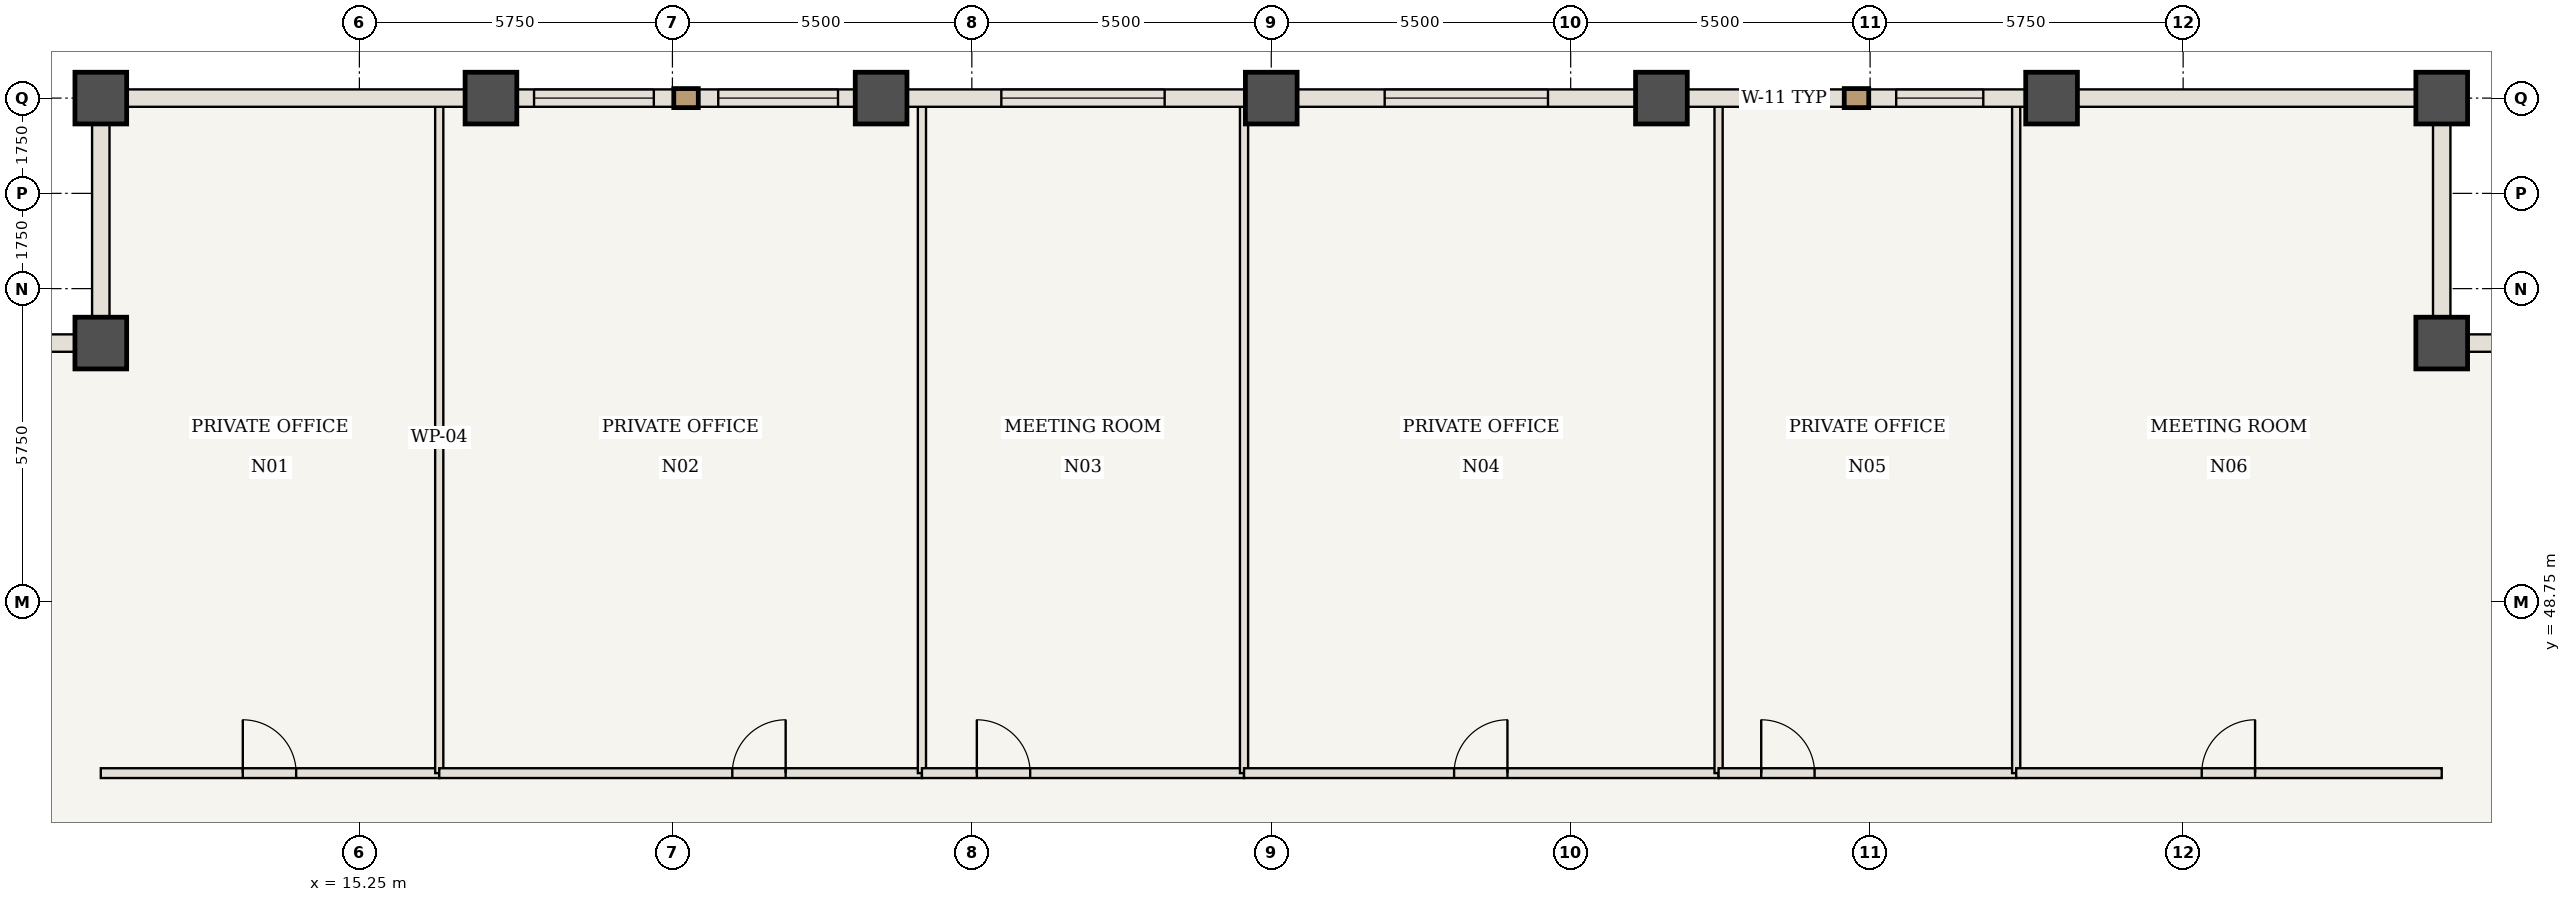
"""IFC4 building model, lengths in metres.
Left out: names, types, materials, properties, quantities, classifications, styles, units other than length and angle.
Written with IfcOpenShell. Run it as: python <this file> out.ifc"""

import sys

from ifc_helpers import new_model, si_unit, direction, frame, frame_2d, origin, origin_2d, place, context, subcontext, project, spatial, rectangle, extrude, element, fill, save


model = new_model("IFC4")
c1 = context("Model", 3, precision=1e-05, world=origin(), true_north=direction((0.0, 1.0)))
c2 = subcontext(c1, "Body", "Model", "MODEL_VIEW")
j1 = project(units=[si_unit("LENGTHUNIT", "METRE"), si_unit("PLANEANGLEUNIT", "RADIAN")], contexts=[c1])
p1 = place(None, origin())
s1 = spatial("IfcSite", under=j1, at=p1, CompositionType="ELEMENT")
p2 = place(p1, origin())
s2 = spatial("IfcBuilding", under=s1, at=p2, CompositionType="ELEMENT")
p3 = place(p2, frame((0.0, 0.0, 114.45)))
s3 = spatial("IfcBuildingStorey", under=s2, at=p3, CompositionType="ELEMENT", Elevation=114.45)
for number, where, z_axis, x_axis in (
    (1, (53.5, 53.5, 0.0), (0.0, 0.0, 1.0), (1.0, 0.0, 0.0)),
    (2, (53.5, 58.0, 0.0), (0.0, 0.0, 1.0), (1.0, 0.0, 0.0)),
    (3, (10.5, 58.0, 0.0), (0.0, 0.0, 1.0), (1.0, 0.0, 0.0)),
    (4, (10.5, 53.5, 0.0), (0.0, 0.0, 1.0), (1.0, 0.0, 0.0)),
    (5, (17.667, 58.0, 0.0), (0.0, 0.0, 1.0), (1.0, 0.0, 0.0)),
    (6, (24.833, 58.0, 0.0), (0.0, 0.0, 1.0), (1.0, 0.0, 0.0)),
    (7, (32.0, 58.0, 0.0), (0.0, 0.0, 1.0), (1.0, 0.0, 0.0)),
    (8, (39.167, 58.0, 0.0), (0.0, 0.0, 1.0), (1.0, 0.0, 0.0)),
    (9, (46.333, 58.0, 0.0), (0.0, 0.0, 1.0), (1.0, 0.0, 0.0)),
):
    element("IfcColumn", number, at=place(p3, frame(where, z_axis=z_axis, x_axis=x_axis)), inside=s3, PredefinedType="COLUMN", context=c2, shape_type="SweptSolid", body=[
        extrude(rectangle(XDim=0.95, YDim=0.95, at=origin_2d()), origin(), (0.0, 0.0, 1.0), 3.85),
    ])
p4 = place(p3, frame((10.5, 45.6, 0.0), z_axis=(0.0, 0.0, 1.0), x_axis=(1.0, 0.0, 0.0)))
e10 = element("IfcWall", 10, at=p4, inside=s3, PredefinedType="STANDARD", context=c2, shape_type="SweptSolid", body=[
    extrude(rectangle(XDim=6.217, YDim=0.18, at=frame_2d((3.108, 0.0))), origin(), (0.0, 0.0, 1.0), 3.685),
])
p5 = place(p4, frame((2.608, 0.0, 0.0)))
e11 = element("IfcOpeningElement", 11, at=p5, cuts=e10, PredefinedType="OPENING", context=c2, shape_type="SweptSolid", body=[
    extrude(rectangle(XDim=0.98, YDim=2.2, at=frame_2d((0.49, 1.1))), frame((0.0, 0.1, 0.0), z_axis=(0.0, -1.0, 0.0), x_axis=(1.0, 0.0, 0.0)), (0.0, 0.0, 1.0), 0.2),
])
p6 = place(p3, frame((16.717, 45.6, 0.0), z_axis=(0.0, 0.0, 1.0), x_axis=(0.0, 1.0, 0.0)))
e12 = element("IfcWall", 12, at=p6, inside=s3, PredefinedType="STANDARD", context=c2, shape_type="SweptSolid", body=[
    extrude(rectangle(XDim=12.34, YDim=0.15, at=frame_2d((6.17, 0.0))), origin(), (0.0, 0.0, 1.0), 3.685),
])
p7 = place(p3, frame((16.717, 45.6, 0.0), z_axis=(0.0, 0.0, 1.0), x_axis=(1.0, 0.0, 0.0)))
e13 = element("IfcWall", 13, at=p7, inside=s3, PredefinedType="STANDARD", context=c2, shape_type="SweptSolid", body=[
    extrude(rectangle(XDim=8.866, YDim=0.18, at=frame_2d((4.433, 0.0))), origin(), (0.0, 0.0, 1.0), 3.685),
])
p8 = place(p7, frame((5.383, 0.0, 0.0)))
e14 = element("IfcOpeningElement", 14, at=p8, cuts=e13, PredefinedType="OPENING", context=c2, shape_type="SweptSolid", body=[
    extrude(rectangle(XDim=0.98, YDim=2.2, at=frame_2d((0.49, 1.1))), frame((0.0, 0.1, 0.0), z_axis=(0.0, -1.0, 0.0), x_axis=(1.0, 0.0, 0.0)), (0.0, 0.0, 1.0), 0.2),
])
p9 = place(p3, frame((25.583, 45.6, 0.0), z_axis=(0.0, 0.0, 1.0), x_axis=(0.0, 1.0, 0.0)))
e15 = element("IfcWall", 15, at=p9, inside=s3, PredefinedType="STANDARD", context=c2, shape_type="SweptSolid", body=[
    extrude(rectangle(XDim=12.34, YDim=0.15, at=frame_2d((6.17, 0.0))), origin(), (0.0, 0.0, 1.0), 3.685),
])
p10 = place(p3, frame((25.583, 45.6, 0.0), z_axis=(0.0, 0.0, 1.0), x_axis=(1.0, 0.0, 0.0)))
e16 = element("IfcWall", 16, at=p10, inside=s3, PredefinedType="STANDARD", context=c2, shape_type="SweptSolid", body=[
    extrude(rectangle(XDim=5.917, YDim=0.18, at=frame_2d((2.958, 0.0))), origin(), (0.0, 0.0, 1.0), 3.685),
])
p11 = place(p10, frame((1.008, 0.0, 0.0)))
e17 = element("IfcOpeningElement", 17, at=p11, cuts=e16, PredefinedType="OPENING", context=c2, shape_type="SweptSolid", body=[
    extrude(rectangle(XDim=0.98, YDim=2.2, at=frame_2d((0.49, 1.1))), frame((0.0, 0.1, 0.0), z_axis=(0.0, -1.0, 0.0), x_axis=(1.0, 0.0, 0.0)), (0.0, 0.0, 1.0), 0.2),
])
p12 = place(p3, frame((31.5, 45.6, 0.0), z_axis=(0.0, 0.0, 1.0), x_axis=(0.0, 1.0, 0.0)))
e18 = element("IfcWall", 18, at=p12, inside=s3, PredefinedType="STANDARD", context=c2, shape_type="SweptSolid", body=[
    extrude(rectangle(XDim=12.34, YDim=0.15, at=frame_2d((6.17, 0.0))), origin(), (0.0, 0.0, 1.0), 3.685),
])
p13 = place(p3, frame((31.5, 45.6, 0.0), z_axis=(0.0, 0.0, 1.0), x_axis=(1.0, 0.0, 0.0)))
e19 = element("IfcWall", 19, at=p13, inside=s3, PredefinedType="STANDARD", context=c2, shape_type="SweptSolid", body=[
    extrude(rectangle(XDim=8.717, YDim=0.18, at=frame_2d((4.358, 0.0))), origin(), (0.0, 0.0, 1.0), 3.685),
])
p14 = place(p13, frame((3.858, 0.0, 0.0)))
e20 = element("IfcOpeningElement", 20, at=p14, cuts=e19, PredefinedType="OPENING", context=c2, shape_type="SweptSolid", body=[
    extrude(rectangle(XDim=0.98, YDim=2.2, at=frame_2d((0.49, 1.1))), frame((0.0, 0.1, 0.0), z_axis=(0.0, -1.0, 0.0), x_axis=(1.0, 0.0, 0.0)), (0.0, 0.0, 1.0), 0.2),
])
p15 = place(p3, frame((40.217, 45.6, 0.0), z_axis=(0.0, 0.0, 1.0), x_axis=(0.0, 1.0, 0.0)))
e21 = element("IfcWall", 21, at=p15, inside=s3, PredefinedType="STANDARD", context=c2, shape_type="SweptSolid", body=[
    extrude(rectangle(XDim=12.34, YDim=0.15, at=frame_2d((6.17, 0.0))), origin(), (0.0, 0.0, 1.0), 3.685),
])
p16 = place(p3, frame((40.217, 45.6, 0.0), z_axis=(0.0, 0.0, 1.0), x_axis=(1.0, 0.0, 0.0)))
e22 = element("IfcWall", 22, at=p16, inside=s3, PredefinedType="STANDARD", context=c2, shape_type="SweptSolid", body=[
    extrude(rectangle(XDim=5.467, YDim=0.18, at=frame_2d((2.733, 0.0))), origin(), (0.0, 0.0, 1.0), 3.685),
])
p17 = place(p16, frame((0.783, 0.0, 0.0)))
e23 = element("IfcOpeningElement", 23, at=p17, cuts=e22, PredefinedType="OPENING", context=c2, shape_type="SweptSolid", body=[
    extrude(rectangle(XDim=0.98, YDim=2.2, at=frame_2d((0.49, 1.1))), frame((0.0, 0.1, 0.0), z_axis=(0.0, -1.0, 0.0), x_axis=(1.0, 0.0, 0.0)), (0.0, 0.0, 1.0), 0.2),
])
p18 = place(p3, frame((45.683, 45.6, 0.0), z_axis=(0.0, 0.0, 1.0), x_axis=(0.0, 1.0, 0.0)))
e24 = element("IfcWall", 24, at=p18, inside=s3, PredefinedType="STANDARD", context=c2, shape_type="SweptSolid", body=[
    extrude(rectangle(XDim=12.34, YDim=0.15, at=frame_2d((6.17, 0.0))), origin(), (0.0, 0.0, 1.0), 3.685),
])
p19 = place(p3, frame((45.683, 45.6, 0.0), z_axis=(0.0, 0.0, 1.0), x_axis=(1.0, 0.0, 0.0)))
e25 = element("IfcWall", 25, at=p19, inside=s3, PredefinedType="STANDARD", context=c2, shape_type="SweptSolid", body=[
    extrude(rectangle(XDim=7.817, YDim=0.18, at=frame_2d((3.908, 0.0))), origin(), (0.0, 0.0, 1.0), 3.685),
])
p20 = place(p19, frame((3.408, 0.0, 0.0)))
e26 = element("IfcOpeningElement", 26, at=p20, cuts=e25, PredefinedType="OPENING", context=c2, shape_type="SweptSolid", body=[
    extrude(rectangle(XDim=0.98, YDim=2.2, at=frame_2d((0.49, 1.1))), frame((0.0, 0.1, 0.0), z_axis=(0.0, -1.0, 0.0), x_axis=(1.0, 0.0, 0.0)), (0.0, 0.0, 1.0), 0.2),
])
p21 = place(p3, frame((10.5, 58.0, 0.0), z_axis=(0.0, 0.0, 1.0), x_axis=(1.0, 0.0, 0.0)))
e27 = element("IfcWall", 27, at=p21, inside=s3, PredefinedType="USERDEFINED", context=c2, shape_type="SweptSolid", body=[
    extrude(rectangle(XDim=7.167, YDim=0.32, at=frame_2d((3.583, 0.0))), origin(), (0.0, 0.0, 1.0), 2.885),
])
p22 = place(p3, frame((17.667, 58.0, 0.0), z_axis=(0.0, 0.0, 1.0), x_axis=(1.0, 0.0, 0.0)))
e28 = element("IfcWall", 28, at=p22, inside=s3, PredefinedType="USERDEFINED", context=c2, shape_type="SweptSolid", body=[
    extrude(rectangle(XDim=7.167, YDim=0.32, at=frame_2d((3.583, 0.0))), origin(), (0.0, 0.0, 1.0), 2.885),
])
p23 = place(p22, frame((0.792, 0.0, 0.85)))
e29 = element("IfcOpeningElement", 29, at=p23, cuts=e28, PredefinedType="OPENING", context=c2, shape_type="SweptSolid", body=[
    extrude(rectangle(XDim=2.2, YDim=1.835, at=frame_2d((1.1, 0.917))), frame((0.0, 0.17, 0.0), z_axis=(0.0, -1.0, 0.0), x_axis=(1.0, 0.0, 0.0)), (0.0, 0.0, 1.0), 0.34),
])
p24 = place(p22, frame((4.175, 0.0, 0.85)))
e30 = element("IfcOpeningElement", 30, at=p24, cuts=e28, PredefinedType="OPENING", context=c2, shape_type="SweptSolid", body=[
    extrude(rectangle(XDim=2.2, YDim=1.835, at=frame_2d((1.1, 0.917))), frame((0.0, 0.17, 0.0), z_axis=(0.0, -1.0, 0.0), x_axis=(1.0, 0.0, 0.0)), (0.0, 0.0, 1.0), 0.34),
])
p25 = place(p3, frame((24.833, 58.0, 0.0), z_axis=(0.0, 0.0, 1.0), x_axis=(1.0, 0.0, 0.0)))
e31 = element("IfcWall", 31, at=p25, inside=s3, PredefinedType="USERDEFINED", context=c2, shape_type="SweptSolid", body=[
    extrude(rectangle(XDim=7.167, YDim=0.32, at=frame_2d((3.583, 0.0))), origin(), (0.0, 0.0, 1.0), 2.885),
])
p26 = place(p25, frame((2.208, 0.0, 0.85)))
e32 = element("IfcOpeningElement", 32, at=p26, cuts=e31, PredefinedType="OPENING", context=c2, shape_type="SweptSolid", body=[
    extrude(rectangle(XDim=3.0, YDim=1.835, at=frame_2d((1.5, 0.917))), frame((0.0, 0.17, 0.0), z_axis=(0.0, -1.0, 0.0), x_axis=(1.0, 0.0, 0.0)), (0.0, 0.0, 1.0), 0.34),
])
p27 = place(p3, frame((32.0, 58.0, 0.0), z_axis=(0.0, 0.0, 1.0), x_axis=(1.0, 0.0, 0.0)))
e33 = element("IfcWall", 33, at=p27, inside=s3, PredefinedType="USERDEFINED", context=c2, shape_type="SweptSolid", body=[
    extrude(rectangle(XDim=7.167, YDim=0.32, at=frame_2d((3.583, 0.0))), origin(), (0.0, 0.0, 1.0), 2.885),
])
p28 = place(p27, frame((2.083, 0.0, 0.85)))
e34 = element("IfcOpeningElement", 34, at=p28, cuts=e33, PredefinedType="OPENING", context=c2, shape_type="SweptSolid", body=[
    extrude(rectangle(XDim=3.0, YDim=1.835, at=frame_2d((1.5, 0.917))), frame((0.0, 0.17, 0.0), z_axis=(0.0, -1.0, 0.0), x_axis=(1.0, 0.0, 0.0)), (0.0, 0.0, 1.0), 0.34),
])
p29 = place(p3, frame((39.167, 58.0, 0.0), z_axis=(0.0, 0.0, 1.0), x_axis=(1.0, 0.0, 0.0)))
e35 = element("IfcWall", 35, at=p29, inside=s3, PredefinedType="USERDEFINED", context=c2, shape_type="SweptSolid", body=[
    extrude(rectangle(XDim=7.167, YDim=0.32, at=frame_2d((3.583, 0.0))), origin(), (0.0, 0.0, 1.0), 2.885),
])
p30 = place(p29, frame((1.454, 0.0, 0.85)))
e36 = element("IfcOpeningElement", 36, at=p30, cuts=e35, PredefinedType="OPENING", context=c2, shape_type="SweptSolid", body=[
    extrude(rectangle(XDim=1.6, YDim=1.835, at=frame_2d((0.8, 0.917))), frame((0.0, 0.17, 0.0), z_axis=(0.0, -1.0, 0.0), x_axis=(1.0, 0.0, 0.0)), (0.0, 0.0, 1.0), 0.34),
])
p31 = place(p29, frame((4.312, 0.0, 0.85)))
e37 = element("IfcOpeningElement", 37, at=p31, cuts=e35, PredefinedType="OPENING", context=c2, shape_type="SweptSolid", body=[
    extrude(rectangle(XDim=1.6, YDim=1.835, at=frame_2d((0.8, 0.917))), frame((0.0, 0.17, 0.0), z_axis=(0.0, -1.0, 0.0), x_axis=(1.0, 0.0, 0.0)), (0.0, 0.0, 1.0), 0.34),
])
p32 = place(p3, frame((46.333, 58.0, 0.0), z_axis=(0.0, 0.0, 1.0), x_axis=(1.0, 0.0, 0.0)))
e38 = element("IfcWall", 38, at=p32, inside=s3, PredefinedType="USERDEFINED", context=c2, shape_type="SweptSolid", body=[
    extrude(rectangle(XDim=7.167, YDim=0.32, at=frame_2d((3.583, 0.0))), origin(), (0.0, 0.0, 1.0), 2.885),
])
for number, where, z_axis, x_axis in (
    (39, (53.5, 53.5, 0.0), (0.0, 0.0, 1.0), (1.0, 0.0, 0.0)),
    (40, (53.5, 58.0, 0.0), (0.0, 0.0, 1.0), (0.0, -1.0, 0.0)),
    (41, (10.5, 53.5, 0.0), (0.0, 0.0, 1.0), (0.0, 1.0, 0.0)),
    (42, (6.0, 53.5, 0.0), (0.0, 0.0, 1.0), (1.0, 0.0, 0.0)),
):
    element("IfcWall", number, at=place(p3, frame(where, z_axis=z_axis, x_axis=x_axis)), inside=s3, PredefinedType="USERDEFINED", context=c2, shape_type="SweptSolid", body=[
        extrude(rectangle(XDim=4.5, YDim=0.32, at=frame_2d((2.25, 0.0))), origin(), (0.0, 0.0, 1.0), 2.885),
    ])
p33 = place(p5, origin())
e43 = element("IfcDoor", 43, at=p33, inside=s3, OperationType="SINGLE_SWING_LEFT", PredefinedType="DOOR", context=c2, shape_type="SweptSolid", body=[
    extrude(rectangle(XDim=0.98, YDim=2.2, at=frame_2d((0.49, 1.1))), frame((0.0, 0.025, 0.0), z_axis=(0.0, -1.0, 0.0), x_axis=(1.0, 0.0, 0.0)), (0.0, 0.0, 1.0), 0.05),
])
fill(e11, e43)
p34 = place(p8, origin())
e44 = element("IfcDoor", 44, at=p34, inside=s3, OperationType="SINGLE_SWING_RIGHT", PredefinedType="DOOR", context=c2, shape_type="SweptSolid", body=[
    extrude(rectangle(XDim=0.98, YDim=2.2, at=frame_2d((0.49, 1.1))), frame((0.0, 0.025, 0.0), z_axis=(0.0, -1.0, 0.0), x_axis=(1.0, 0.0, 0.0)), (0.0, 0.0, 1.0), 0.05),
])
fill(e14, e44)
p35 = place(p11, origin())
e45 = element("IfcDoor", 45, at=p35, inside=s3, OperationType="SINGLE_SWING_LEFT", PredefinedType="DOOR", context=c2, shape_type="SweptSolid", body=[
    extrude(rectangle(XDim=0.98, YDim=2.2, at=frame_2d((0.49, 1.1))), frame((0.0, 0.025, 0.0), z_axis=(0.0, -1.0, 0.0), x_axis=(1.0, 0.0, 0.0)), (0.0, 0.0, 1.0), 0.05),
])
fill(e17, e45)
p36 = place(p14, origin())
e46 = element("IfcDoor", 46, at=p36, inside=s3, OperationType="SINGLE_SWING_RIGHT", PredefinedType="DOOR", context=c2, shape_type="SweptSolid", body=[
    extrude(rectangle(XDim=0.98, YDim=2.2, at=frame_2d((0.49, 1.1))), frame((0.0, 0.025, 0.0), z_axis=(0.0, -1.0, 0.0), x_axis=(1.0, 0.0, 0.0)), (0.0, 0.0, 1.0), 0.05),
])
fill(e20, e46)
p37 = place(p17, origin())
e47 = element("IfcDoor", 47, at=p37, inside=s3, OperationType="SINGLE_SWING_LEFT", PredefinedType="DOOR", context=c2, shape_type="SweptSolid", body=[
    extrude(rectangle(XDim=0.98, YDim=2.2, at=frame_2d((0.49, 1.1))), frame((0.0, 0.025, 0.0), z_axis=(0.0, -1.0, 0.0), x_axis=(1.0, 0.0, 0.0)), (0.0, 0.0, 1.0), 0.05),
])
fill(e23, e47)
p38 = place(p20, origin())
e48 = element("IfcDoor", 48, at=p38, inside=s3, OperationType="SINGLE_SWING_RIGHT", PredefinedType="DOOR", context=c2, shape_type="SweptSolid", body=[
    extrude(rectangle(XDim=0.98, YDim=2.2, at=frame_2d((0.49, 1.1))), frame((0.0, 0.025, 0.0), z_axis=(0.0, -1.0, 0.0), x_axis=(1.0, 0.0, 0.0)), (0.0, 0.0, 1.0), 0.05),
])
fill(e26, e48)
p39 = place(p23, origin())
e49 = element("IfcWindow", 49, at=p39, inside=s3, PartitioningType="SINGLE_PANEL", PredefinedType="WINDOW", context=c2, shape_type="SweptSolid", body=[
    extrude(rectangle(XDim=2.2, YDim=1.835, at=frame_2d((1.1, 0.917))), frame((0.0, 0.03, 0.0), z_axis=(0.0, -1.0, 0.0), x_axis=(1.0, 0.0, 0.0)), (0.0, 0.0, 1.0), 0.06),
])
fill(e29, e49)
p40 = place(p24, origin())
e50 = element("IfcWindow", 50, at=p40, inside=s3, PartitioningType="SINGLE_PANEL", PredefinedType="WINDOW", context=c2, shape_type="SweptSolid", body=[
    extrude(rectangle(XDim=2.2, YDim=1.835, at=frame_2d((1.1, 0.917))), frame((0.0, 0.03, 0.0), z_axis=(0.0, -1.0, 0.0), x_axis=(1.0, 0.0, 0.0)), (0.0, 0.0, 1.0), 0.06),
])
fill(e30, e50)
p41 = place(p26, origin())
e51 = element("IfcWindow", 51, at=p41, inside=s3, PartitioningType="SINGLE_PANEL", PredefinedType="WINDOW", context=c2, shape_type="SweptSolid", body=[
    extrude(rectangle(XDim=3.0, YDim=1.835, at=frame_2d((1.5, 0.917))), frame((0.0, 0.03, 0.0), z_axis=(0.0, -1.0, 0.0), x_axis=(1.0, 0.0, 0.0)), (0.0, 0.0, 1.0), 0.06),
])
fill(e32, e51)
p42 = place(p28, origin())
e52 = element("IfcWindow", 52, at=p42, inside=s3, PartitioningType="SINGLE_PANEL", PredefinedType="WINDOW", context=c2, shape_type="SweptSolid", body=[
    extrude(rectangle(XDim=3.0, YDim=1.835, at=frame_2d((1.5, 0.917))), frame((0.0, 0.03, 0.0), z_axis=(0.0, -1.0, 0.0), x_axis=(1.0, 0.0, 0.0)), (0.0, 0.0, 1.0), 0.06),
])
fill(e34, e52)
p43 = place(p30, origin())
e53 = element("IfcWindow", 53, at=p43, inside=s3, PartitioningType="SINGLE_PANEL", PredefinedType="WINDOW", context=c2, shape_type="SweptSolid", body=[
    extrude(rectangle(XDim=1.6, YDim=1.835, at=frame_2d((0.8, 0.917))), frame((0.0, 0.03, 0.0), z_axis=(0.0, -1.0, 0.0), x_axis=(1.0, 0.0, 0.0)), (0.0, 0.0, 1.0), 0.06),
])
fill(e36, e53)
p44 = place(p31, origin())
e54 = element("IfcWindow", 54, at=p44, inside=s3, PartitioningType="SINGLE_PANEL", PredefinedType="WINDOW", context=c2, shape_type="SweptSolid", body=[
    extrude(rectangle(XDim=1.6, YDim=1.835, at=frame_2d((0.8, 0.917))), frame((0.0, 0.03, 0.0), z_axis=(0.0, -1.0, 0.0), x_axis=(1.0, 0.0, 0.0)), (0.0, 0.0, 1.0), 0.06),
])
fill(e37, e54)
save(model, sys.argv[1])
